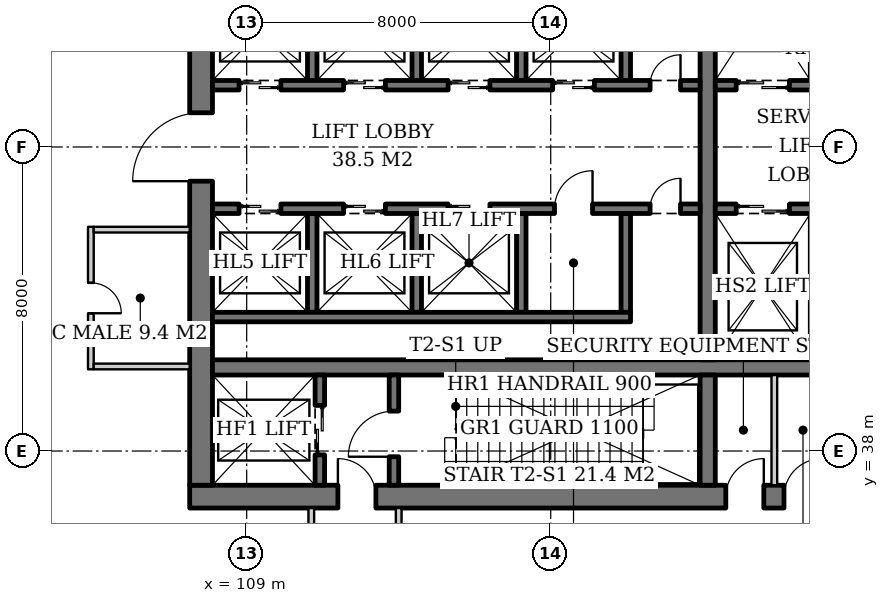
"""IFC4 building model, lengths in metres.
Left out: names, types, materials, properties, quantities, classifications, styles, units other than length and angle.
Written with IfcOpenShell. Run it as: python <this file> out.ifc"""

import sys

from ifc_helpers import new_model, si_unit, direction, frame, frame_2d, origin, place, context, subcontext, project, spatial, rectangle, extrude, element, fill, save


model = new_model("IFC4")
c1 = context("Model", 3, precision=1e-05, world=origin(), true_north=direction((0.0, 1.0)))
c2 = subcontext(c1, "Body", "Model", "MODEL_VIEW")
j1 = project(units=[si_unit("LENGTHUNIT", "METRE"), si_unit("PLANEANGLEUNIT", "RADIAN")], contexts=[c1])
p1 = place(None, origin())
s1 = spatial("IfcSite", under=j1, at=p1, CompositionType="ELEMENT")
p2 = place(p1, origin())
s2 = spatial("IfcBuilding", under=s1, at=p2, CompositionType="ELEMENT")
p3 = place(p2, origin())
s3 = spatial("IfcBuildingStorey", under=s2, at=p3, CompositionType="ELEMENT", Elevation=0.0)
p4 = place(p3, frame((107.5, 36.8, 0.0), z_axis=(0.0, 0.0, 1.0), x_axis=(1.0, 0.0, 0.0)))
e1 = element("IfcWall", 1, at=p4, inside=s3, PredefinedType="SHEAR", context=c2, shape_type="SweptSolid", body=[
    extrude(rectangle(XDim=19.0, YDim=0.6, at=frame_2d((9.5, 0.0))), origin(), (0.0, 0.0, 1.0), 6.0),
])
p5 = place(p4, frame((3.9, 0.0, 0.0)))
e2 = element("IfcOpeningElement", 2, at=p5, cuts=e1, PredefinedType="OPENING", context=c2, shape_type="SweptSolid", body=[
    extrude(rectangle(XDim=1.0, YDim=2.1, at=frame_2d((0.5, 1.05))), frame((0.0, 0.31, 0.0), z_axis=(0.0, -1.0, 0.0), x_axis=(1.0, 0.0, 0.0)), (0.0, 0.0, 1.0), 0.62),
])
p6 = place(p4, frame((14.107, 0.0, 0.0)))
e3 = element("IfcOpeningElement", 3, at=p6, cuts=e1, PredefinedType="OPENING", context=c2, shape_type="SweptSolid", body=[
    extrude(rectangle(XDim=1.0, YDim=2.1, at=frame_2d((0.5, 1.05))), frame((0.0, 0.31, 0.0), z_axis=(0.0, -1.0, 0.0), x_axis=(1.0, 0.0, 0.0)), (0.0, 0.0, 1.0), 0.62),
])
p7 = place(p4, frame((15.638, 0.0, 0.0)))
e4 = element("IfcOpeningElement", 4, at=p7, cuts=e1, PredefinedType="OPENING", context=c2, shape_type="SweptSolid", body=[
    extrude(rectangle(XDim=1.0, YDim=2.1, at=frame_2d((0.5, 1.05))), frame((0.0, 0.31, 0.0), z_axis=(0.0, -1.0, 0.0), x_axis=(1.0, 0.0, 0.0)), (0.0, 0.0, 1.0), 0.62),
])
p8 = place(p4, frame((17.142, 0.0, 0.0)))
e5 = element("IfcOpeningElement", 5, at=p8, cuts=e1, PredefinedType="OPENING", context=c2, shape_type="SweptSolid", body=[
    extrude(rectangle(XDim=1.0, YDim=2.1, at=frame_2d((0.5, 1.05))), frame((0.0, 0.31, 0.0), z_axis=(0.0, -1.0, 0.0), x_axis=(1.0, 0.0, 0.0)), (0.0, 0.0, 1.0), 0.62),
])
p9 = place(p3, frame((107.8, 37.1, 0.0), z_axis=(0.0, 0.0, 1.0), x_axis=(0.0, 1.0, 0.0)))
e6 = element("IfcWall", 6, at=p9, inside=s3, PredefinedType="SHEAR", context=c2, shape_type="SweptSolid", body=[
    extrude(rectangle(XDim=17.8, YDim=0.6, at=frame_2d((8.9, 0.0))), origin(), (0.0, 0.0, 1.0), 6.0),
])
p10 = place(p9, frame((8.0, 0.0, 0.0)))
e7 = element("IfcOpeningElement", 7, at=p10, cuts=e6, PredefinedType="OPENING", context=c2, shape_type="SweptSolid", body=[
    extrude(rectangle(XDim=1.8, YDim=2.4, at=frame_2d((0.9, 1.2))), frame((0.0, 0.31, 0.0), z_axis=(0.0, -1.0, 0.0), x_axis=(1.0, 0.0, 0.0)), (0.0, 0.0, 1.0), 0.62),
])
p11 = place(p3, frame((108.1, 40.2, 0.0), z_axis=(0.0, 0.0, 1.0), x_axis=(1.0, 0.0, 0.0)))
e8 = element("IfcWall", 8, at=p11, inside=s3, PredefinedType="SHEAR", context=c2, shape_type="SweptSolid", body=[
    extrude(rectangle(XDim=17.8, YDim=0.4, at=frame_2d((8.9, 0.0))), origin(), (0.0, 0.0, 1.0), 6.0),
])
p12 = place(p3, frame((121.13, 37.1, 0.0), z_axis=(0.0, 0.0, 1.0), x_axis=(0.0, 1.0, 0.0)))
e9 = element("IfcWall", 9, at=p12, inside=s3, PredefinedType="SHEAR", context=c2, shape_type="SweptSolid", body=[
    extrude(rectangle(XDim=2.9, YDim=0.4, at=frame_2d((1.45, 0.0))), origin(), (0.0, 0.0, 1.0), 6.0),
])
p13 = place(p3, frame((121.13, 40.4, 0.0), z_axis=(0.0, 0.0, 1.0), x_axis=(0.0, 1.0, 0.0)))
e10 = element("IfcWall", 10, at=p13, inside=s3, PredefinedType="SHEAR", context=c2, shape_type="SweptSolid", body=[
    extrude(rectangle(XDim=11.2, YDim=0.4, at=frame_2d((5.6, 0.0))), origin(), (0.0, 0.0, 1.0), 6.0),
])
p14 = place(p3, frame((110.925, 37.1, 0.0), z_axis=(0.0, 0.0, 1.0), x_axis=(0.0, 1.0, 0.0)))
e11 = element("IfcWall", 11, at=p14, inside=s3, PredefinedType="SHEAR", context=c2, shape_type="SweptSolid", body=[
    extrude(rectangle(XDim=2.9, YDim=0.25, at=frame_2d((1.45, 0.0))), origin(), (0.0, 0.0, 1.0), 6.0),
])
p15 = place(p14, frame((0.8, 0.0, 0.0)))
e12 = element("IfcOpeningElement", 12, at=p15, cuts=e11, PredefinedType="OPENING", context=c2, shape_type="SweptSolid", body=[
    extrude(rectangle(XDim=1.3, YDim=2.2, at=frame_2d((0.65, 1.1))), frame((0.0, 0.135, 0.0), z_axis=(0.0, -1.0, 0.0), x_axis=(1.0, 0.0, 0.0)), (0.0, 0.0, 1.0), 0.27),
])
p16 = place(p3, frame((112.875, 37.1, 0.0), z_axis=(0.0, 0.0, 1.0), x_axis=(0.0, 1.0, 0.0)))
e13 = element("IfcWall", 13, at=p16, inside=s3, PredefinedType="SHEAR", context=c2, shape_type="SweptSolid", body=[
    extrude(rectangle(XDim=2.9, YDim=0.25, at=frame_2d((1.45, 0.0))), origin(), (0.0, 0.0, 1.0), 6.0),
])
p17 = place(p16, frame((0.75, 0.0, 0.0)))
e14 = element("IfcOpeningElement", 14, at=p17, cuts=e13, PredefinedType="OPENING", context=c2, shape_type="SweptSolid", body=[
    extrude(rectangle(XDim=1.2, YDim=2.1, at=frame_2d((0.6, 1.05))), frame((0.0, 0.135, 0.0), z_axis=(0.0, -1.0, 0.0), x_axis=(1.0, 0.0, 0.0)), (0.0, 0.0, 1.0), 0.27),
])
for number, where, z_axis, x_axis in (
    (15, (110.725, 47.75, 0.0), (0.0, 0.0, 1.0), (0.0, 1.0, 0.0)),
    (16, (113.475, 47.75, 0.0), (0.0, 0.0, 1.0), (0.0, 1.0, 0.0)),
    (17, (116.225, 47.75, 0.0), (0.0, 0.0, 1.0), (0.0, 1.0, 0.0)),
    (18, (118.975, 47.75, 0.0), (0.0, 0.0, 1.0), (0.0, 1.0, 0.0)),
):
    element("IfcWall", number, at=place(p3, frame(where, z_axis=z_axis, x_axis=x_axis)), inside=s3, PredefinedType="SHEAR", context=c2, shape_type="SweptSolid", body=[
        extrude(rectangle(XDim=2.6, YDim=0.25, at=frame_2d((1.3, 0.0))), origin(), (0.0, 0.0, 1.0), 6.0),
    ])
p18 = place(p3, frame((108.1, 47.625, 0.0), z_axis=(0.0, 0.0, 1.0), x_axis=(1.0, 0.0, 0.0)))
e19 = element("IfcWall", 19, at=p18, inside=s3, PredefinedType="SHEAR", context=c2, shape_type="SweptSolid", body=[
    extrude(rectangle(XDim=12.83, YDim=0.25, at=frame_2d((6.415, 0.0))), origin(), (0.0, 0.0, 1.0), 6.0),
])
p19 = place(p18, frame((0.7, 0.0, 0.0)))
e20 = element("IfcOpeningElement", 20, at=p19, cuts=e19, PredefinedType="OPENING", context=c2, shape_type="SweptSolid", body=[
    extrude(rectangle(XDim=1.1, YDim=2.2, at=frame_2d((0.55, 1.1))), frame((0.0, 0.135, 0.0), z_axis=(0.0, -1.0, 0.0), x_axis=(1.0, 0.0, 0.0)), (0.0, 0.0, 1.0), 0.27),
])
p20 = place(p18, frame((3.45, 0.0, 0.0)))
e21 = element("IfcOpeningElement", 21, at=p20, cuts=e19, PredefinedType="OPENING", context=c2, shape_type="SweptSolid", body=[
    extrude(rectangle(XDim=1.1, YDim=2.2, at=frame_2d((0.55, 1.1))), frame((0.0, 0.135, 0.0), z_axis=(0.0, -1.0, 0.0), x_axis=(1.0, 0.0, 0.0)), (0.0, 0.0, 1.0), 0.27),
])
p21 = place(p18, frame((6.2, 0.0, 0.0)))
e22 = element("IfcOpeningElement", 22, at=p21, cuts=e19, PredefinedType="OPENING", context=c2, shape_type="SweptSolid", body=[
    extrude(rectangle(XDim=1.1, YDim=2.2, at=frame_2d((0.55, 1.1))), frame((0.0, 0.135, 0.0), z_axis=(0.0, -1.0, 0.0), x_axis=(1.0, 0.0, 0.0)), (0.0, 0.0, 1.0), 0.27),
])
p22 = place(p18, frame((8.95, 0.0, 0.0)))
e23 = element("IfcOpeningElement", 23, at=p22, cuts=e19, PredefinedType="OPENING", context=c2, shape_type="SweptSolid", body=[
    extrude(rectangle(XDim=1.1, YDim=2.2, at=frame_2d((0.55, 1.1))), frame((0.0, 0.135, 0.0), z_axis=(0.0, -1.0, 0.0), x_axis=(1.0, 0.0, 0.0)), (0.0, 0.0, 1.0), 0.27),
])
p23 = place(p18, frame((11.515, 0.0, 0.0)))
e24 = element("IfcOpeningElement", 24, at=p23, cuts=e19, PredefinedType="OPENING", context=c2, shape_type="SweptSolid", body=[
    extrude(rectangle(XDim=0.8, YDim=2.0, at=frame_2d((0.4, 1.0))), frame((0.0, 0.135, 0.0), z_axis=(0.0, -1.0, 0.0), x_axis=(1.0, 0.0, 0.0)), (0.0, 0.0, 1.0), 0.27),
])
for number, where, z_axis, x_axis in (
    (25, (110.725, 44.25, 0.0), (0.0, 0.0, 1.0), (0.0, -1.0, 0.0)),
    (26, (113.475, 44.25, 0.0), (0.0, 0.0, 1.0), (0.0, -1.0, 0.0)),
    (27, (116.225, 44.25, 0.0), (0.0, 0.0, 1.0), (0.0, -1.0, 0.0)),
    (28, (118.975, 44.25, 0.0), (0.0, 0.0, 1.0), (0.0, -1.0, 0.0)),
):
    element("IfcWall", number, at=place(p3, frame(where, z_axis=z_axis, x_axis=x_axis)), inside=s3, PredefinedType="SHEAR", context=c2, shape_type="SweptSolid", body=[
        extrude(rectangle(XDim=2.6, YDim=0.25, at=frame_2d((1.3, 0.0))), origin(), (0.0, 0.0, 1.0), 6.0),
    ])
p24 = place(p3, frame((108.1, 41.525, 0.0), z_axis=(0.0, 0.0, 1.0), x_axis=(1.0, 0.0, 0.0)))
e29 = element("IfcWall", 29, at=p24, inside=s3, PredefinedType="SHEAR", context=c2, shape_type="SweptSolid", body=[
    extrude(rectangle(XDim=11.0, YDim=0.25, at=frame_2d((5.5, 0.0))), origin(), (0.0, 0.0, 1.0), 6.0),
])
p25 = place(p3, frame((108.1, 44.375, 0.0), z_axis=(0.0, 0.0, 1.0), x_axis=(1.0, 0.0, 0.0)))
e30 = element("IfcWall", 30, at=p25, inside=s3, PredefinedType="SHEAR", context=c2, shape_type="SweptSolid", body=[
    extrude(rectangle(XDim=12.83, YDim=0.25, at=frame_2d((6.415, 0.0))), origin(), (0.0, 0.0, 1.0), 6.0),
])
p26 = place(p25, frame((0.7, 0.0, 0.0)))
e31 = element("IfcOpeningElement", 31, at=p26, cuts=e30, PredefinedType="OPENING", context=c2, shape_type="SweptSolid", body=[
    extrude(rectangle(XDim=1.1, YDim=2.2, at=frame_2d((0.55, 1.1))), frame((0.0, 0.135, 0.0), z_axis=(0.0, -1.0, 0.0), x_axis=(1.0, 0.0, 0.0)), (0.0, 0.0, 1.0), 0.27),
])
p27 = place(p25, frame((3.45, 0.0, 0.0)))
e32 = element("IfcOpeningElement", 32, at=p27, cuts=e30, PredefinedType="OPENING", context=c2, shape_type="SweptSolid", body=[
    extrude(rectangle(XDim=1.1, YDim=2.2, at=frame_2d((0.55, 1.1))), frame((0.0, 0.135, 0.0), z_axis=(0.0, -1.0, 0.0), x_axis=(1.0, 0.0, 0.0)), (0.0, 0.0, 1.0), 0.27),
])
p28 = place(p25, frame((6.2, 0.0, 0.0)))
e33 = element("IfcOpeningElement", 33, at=p28, cuts=e30, PredefinedType="OPENING", context=c2, shape_type="SweptSolid", body=[
    extrude(rectangle(XDim=1.1, YDim=2.2, at=frame_2d((0.55, 1.1))), frame((0.0, 0.135, 0.0), z_axis=(0.0, -1.0, 0.0), x_axis=(1.0, 0.0, 0.0)), (0.0, 0.0, 1.0), 0.27),
])
p29 = place(p25, frame((9.0, 0.0, 0.0)))
e34 = element("IfcOpeningElement", 34, at=p29, cuts=e30, PredefinedType="OPENING", context=c2, shape_type="SweptSolid", body=[
    extrude(rectangle(XDim=1.0, YDim=2.1, at=frame_2d((0.5, 1.05))), frame((0.0, 0.135, 0.0), z_axis=(0.0, -1.0, 0.0), x_axis=(1.0, 0.0, 0.0)), (0.0, 0.0, 1.0), 0.27),
])
p30 = place(p25, frame((11.515, 0.0, 0.0)))
e35 = element("IfcOpeningElement", 35, at=p30, cuts=e30, PredefinedType="OPENING", context=c2, shape_type="SweptSolid", body=[
    extrude(rectangle(XDim=0.8, YDim=2.0, at=frame_2d((0.4, 1.0))), frame((0.0, 0.135, 0.0), z_axis=(0.0, -1.0, 0.0), x_axis=(1.0, 0.0, 0.0)), (0.0, 0.0, 1.0), 0.27),
])
p31 = place(p3, frame((121.33, 47.625, 0.0), z_axis=(0.0, 0.0, 1.0), x_axis=(1.0, 0.0, 0.0)))
e36 = element("IfcWall", 36, at=p31, inside=s3, PredefinedType="SHEAR", context=c2, shape_type="SweptSolid", body=[
    extrude(rectangle(XDim=4.57, YDim=0.25, at=frame_2d((2.285, 0.0))), origin(), (0.0, 0.0, 1.0), 6.0),
])
p32 = place(p31, frame((0.55, 0.0, 0.0)))
e37 = element("IfcOpeningElement", 37, at=p32, cuts=e36, PredefinedType="OPENING", context=c2, shape_type="SweptSolid", body=[
    extrude(rectangle(XDim=1.4, YDim=2.4, at=frame_2d((0.7, 1.2))), frame((0.0, 0.135, 0.0), z_axis=(0.0, -1.0, 0.0), x_axis=(1.0, 0.0, 0.0)), (0.0, 0.0, 1.0), 0.27),
])
p33 = place(p31, frame((3.26, 0.0, 0.0)))
e38 = element("IfcOpeningElement", 38, at=p33, cuts=e36, PredefinedType="OPENING", context=c2, shape_type="SweptSolid", body=[
    extrude(rectangle(XDim=0.8, YDim=2.0, at=frame_2d((0.4, 1.0))), frame((0.0, 0.135, 0.0), z_axis=(0.0, -1.0, 0.0), x_axis=(1.0, 0.0, 0.0)), (0.0, 0.0, 1.0), 0.27),
])
p34 = place(p3, frame((121.33, 44.375, 0.0), z_axis=(0.0, 0.0, 1.0), x_axis=(1.0, 0.0, 0.0)))
e39 = element("IfcWall", 39, at=p34, inside=s3, PredefinedType="SHEAR", context=c2, shape_type="SweptSolid", body=[
    extrude(rectangle(XDim=4.57, YDim=0.25, at=frame_2d((2.285, 0.0))), origin(), (0.0, 0.0, 1.0), 6.0),
])
p35 = place(p34, frame((0.55, 0.0, 0.0)))
e40 = element("IfcOpeningElement", 40, at=p35, cuts=e39, PredefinedType="OPENING", context=c2, shape_type="SweptSolid", body=[
    extrude(rectangle(XDim=1.4, YDim=2.4, at=frame_2d((0.7, 1.2))), frame((0.0, 0.135, 0.0), z_axis=(0.0, -1.0, 0.0), x_axis=(1.0, 0.0, 0.0)), (0.0, 0.0, 1.0), 0.27),
])
p36 = place(p34, frame((3.26, 0.0, 0.0)))
e41 = element("IfcOpeningElement", 41, at=p36, cuts=e39, PredefinedType="OPENING", context=c2, shape_type="SweptSolid", body=[
    extrude(rectangle(XDim=0.8, YDim=2.0, at=frame_2d((0.4, 1.0))), frame((0.0, 0.135, 0.0), z_axis=(0.0, -1.0, 0.0), x_axis=(1.0, 0.0, 0.0)), (0.0, 0.0, 1.0), 0.27),
])
p37 = place(p3, frame((122.884, 37.1, 0.0), z_axis=(0.0, 0.0, 1.0), x_axis=(0.0, 1.0, 0.0)))
e42 = element("IfcWall", 42, at=p37, inside=s3, PredefinedType="SOLIDWALL", context=c2, shape_type="SweptSolid", body=[
    extrude(rectangle(XDim=2.9, YDim=0.15, at=frame_2d((1.45, 0.0))), origin(), (0.0, 0.0, 1.0), 5.7),
])
p38 = place(p3, frame((104.9, 43.9, 0.0), z_axis=(0.0, 0.0, 1.0), x_axis=(0.0, -1.0, 0.0)))
e43 = element("IfcWall", 43, at=p38, inside=s3, PredefinedType="PARTITIONING", context=c2, shape_type="SweptSolid", body=[
    extrude(rectangle(XDim=3.75, YDim=0.15, at=frame_2d((1.875, 0.0))), origin(), (0.0, 0.0, 1.0), 4.947),
])
p39 = place(p38, frame((1.475, 0.0, 0.0)))
e44 = element("IfcOpeningElement", 44, at=p39, cuts=e43, PredefinedType="OPENING", context=c2, shape_type="SweptSolid", body=[
    extrude(rectangle(XDim=0.8, YDim=2.1, at=frame_2d((0.4, 1.05))), frame((0.0, 0.085, 0.0), z_axis=(0.0, -1.0, 0.0), x_axis=(1.0, 0.0, 0.0)), (0.0, 0.0, 1.0), 0.17),
])
for number, where, z_axis, x_axis in (
    (45, (104.975, 43.825, 0.0), (0.0, 0.0, 1.0), (1.0, 0.0, 0.0)),
    (46, (104.975, 40.225, 0.0), (0.0, 0.0, 1.0), (1.0, 0.0, 0.0)),
):
    element("IfcWall", number, at=place(p3, frame(where, z_axis=z_axis, x_axis=x_axis)), inside=s3, PredefinedType="PARTITIONING", context=c2, shape_type="SweptSolid", body=[
        extrude(rectangle(XDim=2.525, YDim=0.15, at=frame_2d((1.262, 0.0))), origin(), (0.0, 0.0, 1.0), 5.7),
    ])
for number, where, z_axis, x_axis in (
    (47, (110.7, 26.375, 0.0), (0.0, 0.0, 1.0), (0.0, 1.0, 0.0)),
    (48, (113.0, 26.375, 0.0), (0.0, 0.0, 1.0), (0.0, 1.0, 0.0)),
):
    element("IfcWall", number, at=place(p3, frame(where, z_axis=z_axis, x_axis=x_axis)), inside=s3, PredefinedType="SOLIDWALL", context=c2, shape_type="SweptSolid", body=[
        extrude(rectangle(XDim=10.125, YDim=0.15, at=frame_2d((5.062, 0.0))), origin(), (0.0, 0.0, 1.0), 5.15),
    ])
p40 = place(p15, origin())
e49 = element("IfcDoor", 49, at=p40, inside=s3, OperationType="DOUBLE_DOOR_SLIDING", PredefinedType="DOOR", context=c2, shape_type="SweptSolid", body=[
    extrude(rectangle(XDim=1.3, YDim=2.2, at=frame_2d((0.65, 1.1))), frame((0.0, 0.025, 0.0), z_axis=(0.0, -1.0, 0.0), x_axis=(1.0, 0.0, 0.0)), (0.0, 0.0, 1.0), 0.05),
])
fill(e12, e49)
p41 = place(p17, origin())
e50 = element("IfcDoor", 50, at=p41, inside=s3, OperationType="SINGLE_SWING_LEFT", PredefinedType="DOOR", context=c2, shape_type="SweptSolid", body=[
    extrude(rectangle(XDim=1.2, YDim=2.1, at=frame_2d((0.6, 1.05))), frame((0.0, 0.025, 0.0), z_axis=(0.0, -1.0, 0.0), x_axis=(1.0, 0.0, 0.0)), (0.0, 0.0, 1.0), 0.05),
])
fill(e14, e50)
p42 = place(p19, origin())
e51 = element("IfcDoor", 51, at=p42, inside=s3, OperationType="DOUBLE_DOOR_SLIDING", PredefinedType="DOOR", context=c2, shape_type="SweptSolid", body=[
    extrude(rectangle(XDim=1.1, YDim=2.2, at=frame_2d((0.55, 1.1))), frame((0.0, 0.025, 0.0), z_axis=(0.0, -1.0, 0.0), x_axis=(1.0, 0.0, 0.0)), (0.0, 0.0, 1.0), 0.05),
])
fill(e20, e51)
p43 = place(p20, origin())
e52 = element("IfcDoor", 52, at=p43, inside=s3, OperationType="DOUBLE_DOOR_SLIDING", PredefinedType="DOOR", context=c2, shape_type="SweptSolid", body=[
    extrude(rectangle(XDim=1.1, YDim=2.2, at=frame_2d((0.55, 1.1))), frame((0.0, 0.025, 0.0), z_axis=(0.0, -1.0, 0.0), x_axis=(1.0, 0.0, 0.0)), (0.0, 0.0, 1.0), 0.05),
])
fill(e21, e52)
p44 = place(p21, origin())
e53 = element("IfcDoor", 53, at=p44, inside=s3, OperationType="DOUBLE_DOOR_SLIDING", PredefinedType="DOOR", context=c2, shape_type="SweptSolid", body=[
    extrude(rectangle(XDim=1.1, YDim=2.2, at=frame_2d((0.55, 1.1))), frame((0.0, 0.025, 0.0), z_axis=(0.0, -1.0, 0.0), x_axis=(1.0, 0.0, 0.0)), (0.0, 0.0, 1.0), 0.05),
])
fill(e22, e53)
p45 = place(p22, origin())
e54 = element("IfcDoor", 54, at=p45, inside=s3, OperationType="DOUBLE_DOOR_SLIDING", PredefinedType="DOOR", context=c2, shape_type="SweptSolid", body=[
    extrude(rectangle(XDim=1.1, YDim=2.2, at=frame_2d((0.55, 1.1))), frame((0.0, 0.025, 0.0), z_axis=(0.0, -1.0, 0.0), x_axis=(1.0, 0.0, 0.0)), (0.0, 0.0, 1.0), 0.05),
])
fill(e23, e54)
p46 = place(p23, origin())
e55 = element("IfcDoor", 55, at=p46, inside=s3, OperationType="SINGLE_SWING_RIGHT", PredefinedType="DOOR", context=c2, shape_type="SweptSolid", body=[
    extrude(rectangle(XDim=0.8, YDim=2.0, at=frame_2d((0.4, 1.0))), frame((0.0, 0.025, 0.0), z_axis=(0.0, -1.0, 0.0), x_axis=(1.0, 0.0, 0.0)), (0.0, 0.0, 1.0), 0.05),
])
fill(e24, e55)
p47 = place(p26, origin())
e56 = element("IfcDoor", 56, at=p47, inside=s3, OperationType="DOUBLE_DOOR_SLIDING", PredefinedType="DOOR", context=c2, shape_type="SweptSolid", body=[
    extrude(rectangle(XDim=1.1, YDim=2.2, at=frame_2d((0.55, 1.1))), frame((0.0, 0.025, 0.0), z_axis=(0.0, -1.0, 0.0), x_axis=(1.0, 0.0, 0.0)), (0.0, 0.0, 1.0), 0.05),
])
fill(e31, e56)
p48 = place(p27, origin())
e57 = element("IfcDoor", 57, at=p48, inside=s3, OperationType="DOUBLE_DOOR_SLIDING", PredefinedType="DOOR", context=c2, shape_type="SweptSolid", body=[
    extrude(rectangle(XDim=1.1, YDim=2.2, at=frame_2d((0.55, 1.1))), frame((0.0, 0.025, 0.0), z_axis=(0.0, -1.0, 0.0), x_axis=(1.0, 0.0, 0.0)), (0.0, 0.0, 1.0), 0.05),
])
fill(e32, e57)
p49 = place(p28, origin())
e58 = element("IfcDoor", 58, at=p49, inside=s3, OperationType="DOUBLE_DOOR_SLIDING", PredefinedType="DOOR", context=c2, shape_type="SweptSolid", body=[
    extrude(rectangle(XDim=1.1, YDim=2.2, at=frame_2d((0.55, 1.1))), frame((0.0, 0.025, 0.0), z_axis=(0.0, -1.0, 0.0), x_axis=(1.0, 0.0, 0.0)), (0.0, 0.0, 1.0), 0.05),
])
fill(e33, e58)
p50 = place(p29, origin())
e59 = element("IfcDoor", 59, at=p50, inside=s3, OperationType="SINGLE_SWING_RIGHT", PredefinedType="DOOR", context=c2, shape_type="SweptSolid", body=[
    extrude(rectangle(XDim=1.0, YDim=2.1, at=frame_2d((0.5, 1.05))), frame((0.0, 0.025, 0.0), z_axis=(0.0, -1.0, 0.0), x_axis=(1.0, 0.0, 0.0)), (0.0, 0.0, 1.0), 0.05),
])
fill(e34, e59)
p51 = place(p30, origin())
e60 = element("IfcDoor", 60, at=p51, inside=s3, OperationType="SINGLE_SWING_RIGHT", PredefinedType="DOOR", context=c2, shape_type="SweptSolid", body=[
    extrude(rectangle(XDim=0.8, YDim=2.0, at=frame_2d((0.4, 1.0))), frame((0.0, 0.025, 0.0), z_axis=(0.0, -1.0, 0.0), x_axis=(1.0, 0.0, 0.0)), (0.0, 0.0, 1.0), 0.05),
])
fill(e35, e60)
p52 = place(p32, origin())
e61 = element("IfcDoor", 61, at=p52, inside=s3, OperationType="DOUBLE_DOOR_SLIDING", PredefinedType="DOOR", context=c2, shape_type="SweptSolid", body=[
    extrude(rectangle(XDim=1.4, YDim=2.4, at=frame_2d((0.7, 1.2))), frame((0.0, 0.025, 0.0), z_axis=(0.0, -1.0, 0.0), x_axis=(1.0, 0.0, 0.0)), (0.0, 0.0, 1.0), 0.05),
])
fill(e37, e61)
p53 = place(p35, origin())
e62 = element("IfcDoor", 62, at=p53, inside=s3, OperationType="DOUBLE_DOOR_SLIDING", PredefinedType="DOOR", context=c2, shape_type="SweptSolid", body=[
    extrude(rectangle(XDim=1.4, YDim=2.4, at=frame_2d((0.7, 1.2))), frame((0.0, 0.025, 0.0), z_axis=(0.0, -1.0, 0.0), x_axis=(1.0, 0.0, 0.0)), (0.0, 0.0, 1.0), 0.05),
])
fill(e40, e62)
p54 = place(p5, origin())
e63 = element("IfcDoor", 63, at=p54, inside=s3, OperationType="SINGLE_SWING_LEFT", PredefinedType="DOOR", context=c2, shape_type="SweptSolid", body=[
    extrude(rectangle(XDim=1.0, YDim=2.1, at=frame_2d((0.5, 1.05))), frame((0.0, 0.025, 0.0), z_axis=(0.0, -1.0, 0.0), x_axis=(1.0, 0.0, 0.0)), (0.0, 0.0, 1.0), 0.05),
])
fill(e2, e63)
p55 = place(p10, origin())
e64 = element("IfcDoor", 64, at=p55, inside=s3, OperationType="DOUBLE_DOOR_SINGLE_SWING", PredefinedType="DOOR", context=c2, shape_type="SweptSolid", body=[
    extrude(rectangle(XDim=1.8, YDim=2.4, at=frame_2d((0.9, 1.2))), frame((0.0, 0.025, 0.0), z_axis=(0.0, -1.0, 0.0), x_axis=(1.0, 0.0, 0.0)), (0.0, 0.0, 1.0), 0.05),
])
fill(e7, e64)
p56 = place(p6, origin())
e65 = element("IfcDoor", 65, at=p56, inside=s3, OperationType="SINGLE_SWING_RIGHT", PredefinedType="DOOR", context=c2, shape_type="SweptSolid", body=[
    extrude(rectangle(XDim=1.0, YDim=2.1, at=frame_2d((0.5, 1.05))), frame((0.0, 0.29, 0.0), z_axis=(0.0, -1.0, 0.0), x_axis=(1.0, 0.0, 0.0)), (0.0, 0.0, 1.0), 0.05),
])
fill(e3, e65)
p57 = place(p7, origin())
e66 = element("IfcDoor", 66, at=p57, inside=s3, OperationType="SINGLE_SWING_RIGHT", PredefinedType="DOOR", context=c2, shape_type="SweptSolid", body=[
    extrude(rectangle(XDim=1.0, YDim=2.1, at=frame_2d((0.5, 1.05))), frame((0.0, 0.29, 0.0), z_axis=(0.0, -1.0, 0.0), x_axis=(1.0, 0.0, 0.0)), (0.0, 0.0, 1.0), 0.05),
])
fill(e4, e66)
p58 = place(p39, origin())
e67 = element("IfcDoor", 67, at=p58, inside=s3, OperationType="SINGLE_SWING_RIGHT", PredefinedType="DOOR", context=c2, shape_type="SweptSolid", body=[
    extrude(rectangle(XDim=0.8, YDim=2.1, at=frame_2d((0.4, 1.05))), frame((0.0, 0.025, 0.0), z_axis=(0.0, -1.0, 0.0), x_axis=(1.0, 0.0, 0.0)), (0.0, 0.0, 1.0), 0.05),
])
fill(e44, e67)
save(model, sys.argv[1])
